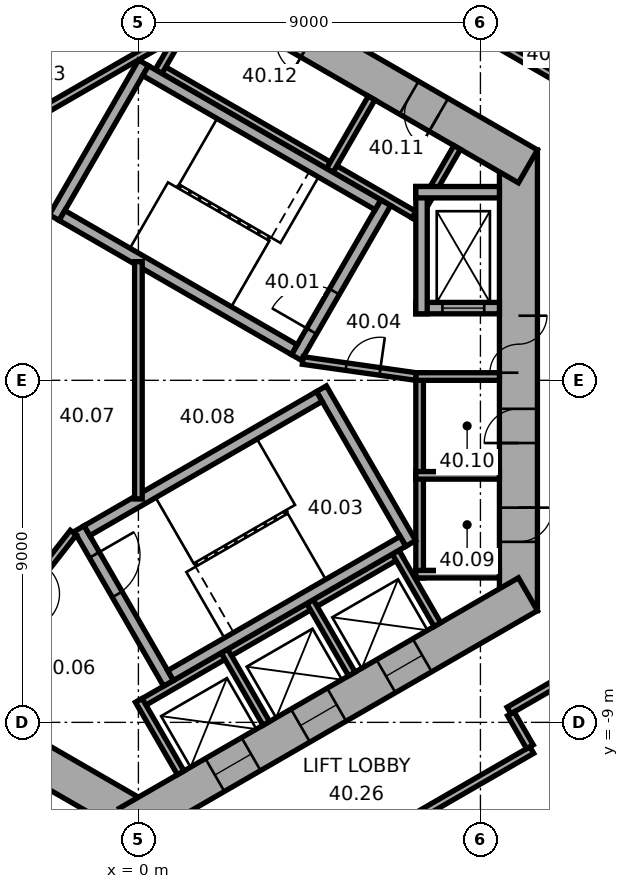
"""IFC4 building model, lengths in metres.
Left out: names, types, materials, properties, quantities, classifications, styles, units other than length and angle.
Written with IfcOpenShell. Run it as: python <this file> out.ifc"""

import sys

from ifc_helpers import new_model, si_unit, direction, frame, frame_2d, origin, place, context, subcontext, project, spatial, rectangle, extrude, element, fill, save


model = new_model("IFC4")
c1 = context("Model", 3, precision=1e-05, world=origin(), true_north=direction((0.0, 1.0)))
c2 = subcontext(c1, "Body", "Model", "MODEL_VIEW")
j1 = project(units=[si_unit("LENGTHUNIT", "METRE"), si_unit("PLANEANGLEUNIT", "RADIAN")], contexts=[c1])
p1 = place(None, origin())
s1 = spatial("IfcSite", under=j1, at=p1, CompositionType="ELEMENT")
p2 = place(p1, origin())
s2 = spatial("IfcBuilding", under=s1, at=p2, CompositionType="ELEMENT")
p3 = place(p2, frame((0.0, 0.0, 165.1)))
s3 = spatial("IfcBuildingStorey", under=s2, at=p3, CompositionType="ELEMENT", Elevation=165.1)
p4 = place(p3, frame((10.0, -6.062, 0.0), z_axis=(0.0, 0.0, 1.0), x_axis=(0.0, 1.0, 0.0)))
e1 = element("IfcWall", 1, at=p4, inside=s3, PredefinedType="SHEAR", context=c2, shape_type="SweptSolid", body=[
    extrude(rectangle(XDim=12.125, YDim=1.0, at=frame_2d((6.062, 0.0))), origin(), (0.0, 0.0, 1.0), 3.7),
])
p5 = place(p4, frame((6.262, 0.0, 0.0)))
e2 = element("IfcOpeningElement", 2, at=p5, cuts=e1, PredefinedType="OPENING", context=c2, shape_type="SweptSolid", body=[
    extrude(rectangle(XDim=1.5, YDim=2.1, at=frame_2d((0.75, 1.05))), frame((0.0, 0.51, 0.0), z_axis=(0.0, -1.0, 0.0), x_axis=(1.0, 0.0, 0.0)), (0.0, 0.0, 1.0), 1.02),
])
p6 = place(p4, frame((1.812, 0.0, 0.0)))
e3 = element("IfcOpeningElement", 3, at=p6, cuts=e1, PredefinedType="OPENING", context=c2, shape_type="SweptSolid", body=[
    extrude(rectangle(XDim=0.9, YDim=2.1, at=frame_2d((0.45, 1.05))), frame((0.0, 0.51, 0.0), z_axis=(0.0, -1.0, 0.0), x_axis=(1.0, 0.0, 0.0)), (0.0, 0.0, 1.0), 1.02),
])
p7 = place(p4, frame((4.412, 0.0, 0.0)))
e4 = element("IfcOpeningElement", 4, at=p7, cuts=e1, PredefinedType="OPENING", context=c2, shape_type="SweptSolid", body=[
    extrude(rectangle(XDim=0.9, YDim=2.1, at=frame_2d((0.45, 1.05))), frame((0.0, 0.51, 0.0), z_axis=(0.0, -1.0, 0.0), x_axis=(1.0, 0.0, 0.0)), (0.0, 0.0, 1.0), 1.02),
])
p8 = place(p3, frame((10.25, 5.629, 0.0), z_axis=(0.0, 0.0, 1.0), x_axis=(-0.866022616891, 0.50000482701, 0.0)))
e5 = element("IfcWall", 5, at=p8, inside=s3, PredefinedType="SHEAR", context=c2, shape_type="SweptSolid", body=[
    extrude(rectangle(XDim=12.125, YDim=1.0, at=frame_2d((6.062, 0.0))), origin(), (0.0, 0.0, 1.0), 3.7),
])
p9 = place(p8, frame((2.712, 0.0, 0.0)))
e6 = element("IfcOpeningElement", 6, at=p9, cuts=e5, PredefinedType="OPENING", context=c2, shape_type="SweptSolid", body=[
    extrude(rectangle(XDim=0.9, YDim=2.1, at=frame_2d((0.45, 1.05))), frame((0.0, 0.51, 0.0), z_axis=(0.0, -1.0, 0.0), x_axis=(1.0, 0.0, 0.0)), (0.0, 0.0, 1.0), 1.02),
])
p10 = place(p8, frame((6.612, 0.0, 0.0)))
e7 = element("IfcOpeningElement", 7, at=p10, cuts=e5, PredefinedType="OPENING", context=c2, shape_type="SweptSolid", body=[
    extrude(rectangle(XDim=0.9, YDim=2.1, at=frame_2d((0.45, 1.05))), frame((0.0, 0.51, 0.0), z_axis=(0.0, -1.0, 0.0), x_axis=(1.0, 0.0, 0.0)), (0.0, 0.0, 1.0), 1.02),
])
p11 = place(p3, frame((0.25, 11.691, 0.0), z_axis=(0.0, 0.0, 1.0), x_axis=(-0.866022616891, -0.50000482701, 0.0)))
e8 = element("IfcWall", 8, at=p11, inside=s3, PredefinedType="SHEAR", context=c2, shape_type="SweptSolid", body=[
    extrude(rectangle(XDim=12.125, YDim=1.0, at=frame_2d((6.062, 0.0))), origin(), (0.0, 0.0, 1.0), 3.7),
])
p12 = place(p11, frame((6.262, 0.0, 0.0)))
e9 = element("IfcOpeningElement", 9, at=p12, cuts=e8, PredefinedType="OPENING", context=c2, shape_type="SweptSolid", body=[
    extrude(rectangle(XDim=1.5, YDim=2.1, at=frame_2d((0.75, 1.05))), frame((0.0, 0.51, 0.0), z_axis=(0.0, -1.0, 0.0), x_axis=(1.0, 0.0, 0.0)), (0.0, 0.0, 1.0), 1.02),
])
p13 = place(p11, frame((3.112, 0.0, 0.0)))
e10 = element("IfcOpeningElement", 10, at=p13, cuts=e8, PredefinedType="OPENING", context=c2, shape_type="SweptSolid", body=[
    extrude(rectangle(XDim=0.9, YDim=2.1, at=frame_2d((0.45, 1.05))), frame((0.0, 0.51, 0.0), z_axis=(0.0, -1.0, 0.0), x_axis=(1.0, 0.0, 0.0)), (0.0, 0.0, 1.0), 1.02),
])
p14 = place(p3, frame((-10.25, -5.629, 0.0), z_axis=(0.0, 0.0, 1.0), x_axis=(0.866022616891, -0.50000482701, 0.0)))
e11 = element("IfcWall", 11, at=p14, inside=s3, PredefinedType="SHEAR", context=c2, shape_type="SweptSolid", body=[
    extrude(rectangle(XDim=12.125, YDim=1.0, at=frame_2d((6.062, 0.0))), origin(), (0.0, 0.0, 1.0), 3.7),
])
p15 = place(p14, frame((6.262, 0.0, 0.0)))
e12 = element("IfcOpeningElement", 12, at=p15, cuts=e11, PredefinedType="OPENING", context=c2, shape_type="SweptSolid", body=[
    extrude(rectangle(XDim=1.5, YDim=2.1, at=frame_2d((0.75, 1.05))), frame((0.0, 0.51, 0.0), z_axis=(0.0, -1.0, 0.0), x_axis=(1.0, 0.0, 0.0)), (0.0, 0.0, 1.0), 1.02),
])
p16 = place(p14, frame((1.712, 0.0, 0.0)))
e13 = element("IfcOpeningElement", 13, at=p16, cuts=e11, PredefinedType="OPENING", context=c2, shape_type="SweptSolid", body=[
    extrude(rectangle(XDim=1.1, YDim=2.1, at=frame_2d((0.55, 1.05))), frame((0.0, 0.51, 0.0), z_axis=(0.0, -1.0, 0.0), x_axis=(1.0, 0.0, 0.0)), (0.0, 0.0, 1.0), 1.02),
])
p17 = place(p14, frame((4.312, 0.0, 0.0)))
e14 = element("IfcOpeningElement", 14, at=p17, cuts=e11, PredefinedType="OPENING", context=c2, shape_type="SweptSolid", body=[
    extrude(rectangle(XDim=1.1, YDim=2.1, at=frame_2d((0.55, 1.05))), frame((0.0, 0.51, 0.0), z_axis=(0.0, -1.0, 0.0), x_axis=(1.0, 0.0, 0.0)), (0.0, 0.0, 1.0), 1.02),
])
p18 = place(p3, frame((-0.25, -11.691, 0.0), z_axis=(0.0, 0.0, 1.0), x_axis=(0.866022616891, 0.50000482701, 0.0)))
e15 = element("IfcWall", 15, at=p18, inside=s3, PredefinedType="SHEAR", context=c2, shape_type="SweptSolid", body=[
    extrude(rectangle(XDim=12.125, YDim=1.0, at=frame_2d((6.062, 0.0))), origin(), (0.0, 0.0, 1.0), 3.7),
])
p19 = place(p18, frame((2.612, 0.0, 0.0)))
e16 = element("IfcOpeningElement", 16, at=p19, cuts=e15, PredefinedType="OPENING", context=c2, shape_type="SweptSolid", body=[
    extrude(rectangle(XDim=1.1, YDim=2.1, at=frame_2d((0.55, 1.05))), frame((0.0, 0.51, 0.0), z_axis=(0.0, -1.0, 0.0), x_axis=(1.0, 0.0, 0.0)), (0.0, 0.0, 1.0), 1.02),
])
p20 = place(p18, frame((5.212, 0.0, 0.0)))
e17 = element("IfcOpeningElement", 17, at=p20, cuts=e15, PredefinedType="OPENING", context=c2, shape_type="SweptSolid", body=[
    extrude(rectangle(XDim=1.1, YDim=2.1, at=frame_2d((0.55, 1.05))), frame((0.0, 0.51, 0.0), z_axis=(0.0, -1.0, 0.0), x_axis=(1.0, 0.0, 0.0)), (0.0, 0.0, 1.0), 1.02),
])
p21 = place(p18, frame((7.812, 0.0, 0.0)))
e18 = element("IfcOpeningElement", 18, at=p21, cuts=e15, PredefinedType="OPENING", context=c2, shape_type="SweptSolid", body=[
    extrude(rectangle(XDim=1.1, YDim=2.1, at=frame_2d((0.55, 1.05))), frame((0.0, 0.51, 0.0), z_axis=(0.0, -1.0, 0.0), x_axis=(1.0, 0.0, 0.0)), (0.0, 0.0, 1.0), 1.02),
])
p22 = place(p3, frame((7.4, -5.2, 0.0), z_axis=(0.0, 0.0, 1.0), x_axis=(0.0, 1.0, 0.0)))
e19 = element("IfcWall", 19, at=p22, inside=s3, PredefinedType="PARTITIONING", context=c2, shape_type="SweptSolid", body=[
    extrude(rectangle(XDim=5.4, YDim=0.2, at=frame_2d((2.7, 0.0))), origin(), (0.0, 0.0, 1.0), 3.42),
])
for number, where, z_axis, x_axis in (
    (20, (7.3, -5.1, 0.0), (0.0, 0.0, 1.0), (1.0, 0.0, 0.0)),
    (21, (7.3, -2.5, 0.0), (0.0, 0.0, 1.0), (1.0, 0.0, 0.0)),
    (22, (7.3, 0.1, 0.0), (0.0, 0.0, 1.0), (1.0, 0.0, 0.0)),
):
    element("IfcWall", number, at=place(p3, frame(where, z_axis=z_axis, x_axis=x_axis)), inside=s3, PredefinedType="PARTITIONING", context=c2, shape_type="SweptSolid", body=[
        extrude(rectangle(XDim=2.2, YDim=0.2, at=frame_2d((1.1, 0.0))), origin(), (0.0, 0.0, 1.0), 3.42),
    ])
p23 = place(p3, frame((7.424, 4.259, 0.0), z_axis=(0.0, 0.0, 1.0), x_axis=(-0.866026010844, 0.49999894854, 0.0)))
e23 = element("IfcWall", 23, at=p23, inside=s3, PredefinedType="PARTITIONING", context=c2, shape_type="SweptSolid", body=[
    extrude(rectangle(XDim=8.0, YDim=0.2, at=frame_2d((4.0, 0.0))), origin(), (0.0, 0.0, 1.0), 3.42),
])
for number, where, z_axis, x_axis in (
    (24, (7.287, 4.222, 0.0), (0.0, 0.0, 1.0), (0.5, 0.866, 0.0)),
    (25, (5.036, 5.522, 0.0), (0.0, 0.0, 1.0), (0.5, 0.866, 0.0)),
    (26, (0.532, 8.122, 0.0), (0.0, 0.0, 1.0), (0.5, 0.866, 0.0)),
):
    element("IfcWall", number, at=place(p3, frame(where, z_axis=z_axis, x_axis=x_axis)), inside=s3, PredefinedType="PARTITIONING", context=c2, shape_type="SweptSolid", body=[
        extrude(rectangle(XDim=2.2, YDim=0.2, at=frame_2d((1.1, 0.0))), origin(), (0.0, 0.0, 1.0), 3.42),
    ])
p24 = place(p3, frame((0.803, 9.009, 0.0), z_axis=(0.0, 0.0, 1.0), x_axis=(-0.866028230842, -0.499995103361, 0.0)))
e27 = element("IfcWall", 27, at=p24, inside=s3, PredefinedType="PARTITIONING", context=c2, shape_type="SweptSolid", body=[
    extrude(rectangle(XDim=5.4, YDim=0.2, at=frame_2d((2.7, 0.0))), origin(), (0.0, 0.0, 1.0), 3.42),
])
p25 = place(p3, frame((-0.024, -8.559, 0.0), z_axis=(0.0, 0.0, 1.0), x_axis=(0.866026010844, 0.49999894854, 0.0)))
e28 = element("IfcWall", 28, at=p25, inside=s3, PredefinedType="PARTITIONING", context=c2, shape_type="SweptSolid", body=[
    extrude(rectangle(XDim=8.0, YDim=0.2, at=frame_2d((4.0, 0.0))), origin(), (0.0, 0.0, 1.0), 3.42),
])
for number, where, z_axis, x_axis in (
    (29, (0.013, -8.422, 0.0), (0.0, 0.0, 1.0), (0.5, -0.866, 0.0)),
    (30, (2.264, -7.122, 0.0), (0.0, 0.0, 1.0), (0.5, -0.866, 0.0)),
    (31, (4.516, -5.822, 0.0), (0.0, 0.0, 1.0), (0.5, -0.866, 0.0)),
    (32, (6.768, -4.522, 0.0), (0.0, 0.0, 1.0), (0.5, -0.866, 0.0)),
):
    element("IfcWall", number, at=place(p3, frame(where, z_axis=z_axis, x_axis=x_axis)), inside=s3, PredefinedType="PARTITIONING", context=c2, shape_type="SweptSolid", body=[
        extrude(rectangle(XDim=2.2, YDim=0.2, at=frame_2d((1.1, 0.0))), origin(), (0.0, 0.0, 1.0), 3.42),
    ])
p26 = place(p3, frame((4.158, 0.602, 0.0), z_axis=(0.0, 0.0, 1.0), x_axis=(0.499977259774, 0.866038532462, 0.0)))
e33 = element("IfcWall", 33, at=p26, inside=s3, PredefinedType="SHEAR", context=c2, shape_type="SweptSolid", body=[
    extrude(rectangle(XDim=4.7, YDim=0.3, at=frame_2d((2.35, 0.0))), origin(), (0.0, 0.0, 1.0), 3.42),
])
p27 = place(p26, frame((0.8, 0.0, 0.0)))
e34 = element("IfcOpeningElement", 34, at=p27, cuts=e33, PredefinedType="OPENING", context=c2, shape_type="SweptSolid", body=[
    extrude(rectangle(XDim=1.2, YDim=2.1, at=frame_2d((0.6, 1.05))), frame((0.0, 0.16, 0.0), z_axis=(0.0, -1.0, 0.0), x_axis=(1.0, 0.0, 0.0)), (0.0, 0.0, 1.0), 0.32),
])
p28 = place(p3, frame((-2.216, 4.282, 0.0), z_axis=(0.0, 0.0, 1.0), x_axis=(0.499977259774, 0.866038532462, 0.0)))
e35 = element("IfcWall", 35, at=p28, inside=s3, PredefinedType="SHEAR", context=c2, shape_type="SweptSolid", body=[
    extrude(rectangle(XDim=4.7, YDim=0.3, at=frame_2d((2.35, 0.0))), origin(), (0.0, 0.0, 1.0), 3.42),
])
for number, where, z_axis, x_axis in (
    (36, (4.103, 0.807, 0.0), (0.0, 0.0, 1.0), (-0.866, 0.5, 0.0)),
    (37, (6.303, 4.617, 0.0), (0.0, 0.0, 1.0), (-0.866, 0.5, 0.0)),
):
    element("IfcWall", number, at=place(p3, frame(where, z_axis=z_axis, x_axis=x_axis)), inside=s3, PredefinedType="SHEAR", context=c2, shape_type="SweptSolid", body=[
        extrude(rectangle(XDim=7.06, YDim=0.3, at=frame_2d((3.53, 0.0))), origin(), (0.0, 0.0, 1.0), 3.42),
    ])
p29 = place(p3, frame((-1.558, -3.902, 0.0), z_axis=(0.0, 0.0, 1.0), x_axis=(0.499977259774, -0.866038532462, 0.0)))
e38 = element("IfcWall", 38, at=p29, inside=s3, PredefinedType="SHEAR", context=c2, shape_type="SweptSolid", body=[
    extrude(rectangle(XDim=4.7, YDim=0.3, at=frame_2d((2.35, 0.0))), origin(), (0.0, 0.0, 1.0), 3.42),
])
p30 = place(p29, frame((0.8, 0.0, 0.0)))
e39 = element("IfcOpeningElement", 39, at=p30, cuts=e38, PredefinedType="OPENING", context=c2, shape_type="SweptSolid", body=[
    extrude(rectangle(XDim=1.2, YDim=2.1, at=frame_2d((0.6, 1.05))), frame((0.0, 0.16, 0.0), z_axis=(0.0, -1.0, 0.0), x_axis=(1.0, 0.0, 0.0)), (0.0, 0.0, 1.0), 0.32),
])
p31 = place(p3, frame((4.816, -0.222, 0.0), z_axis=(0.0, 0.0, 1.0), x_axis=(0.499977259774, -0.866038532462, 0.0)))
e40 = element("IfcWall", 40, at=p31, inside=s3, PredefinedType="SHEAR", context=c2, shape_type="SweptSolid", body=[
    extrude(rectangle(XDim=4.7, YDim=0.3, at=frame_2d((2.35, 0.0))), origin(), (0.0, 0.0, 1.0), 3.42),
])
for number, where, z_axis, x_axis in (
    (41, (-1.353, -3.957, 0.0), (0.0, 0.0, 1.0), (0.866, 0.5, 0.0)),
    (42, (0.847, -7.767, 0.0), (0.0, 0.0, 1.0), (0.866, 0.5, 0.0)),
):
    element("IfcWall", number, at=place(p3, frame(where, z_axis=z_axis, x_axis=x_axis)), inside=s3, PredefinedType="SHEAR", context=c2, shape_type="SweptSolid", body=[
        extrude(rectangle(XDim=7.06, YDim=0.3, at=frame_2d((3.53, 0.0))), origin(), (0.0, 0.0, 1.0), 3.42),
    ])
p32 = place(p3, frame((7.3, 1.9, 0.0), z_axis=(0.0, 0.0, 1.0), x_axis=(1.0, 0.0, 0.0)))
e43 = element("IfcWall", 43, at=p32, inside=s3, PredefinedType="SHEAR", context=c2, shape_type="SweptSolid", body=[
    extrude(rectangle(XDim=2.2, YDim=0.3, at=frame_2d((1.1, 0.0))), origin(), (0.0, 0.0, 1.0), 3.42),
])
p33 = place(p32, frame((0.7, 0.0, 0.0)))
e44 = element("IfcOpeningElement", 44, at=p33, cuts=e43, PredefinedType="OPENING", context=c2, shape_type="SweptSolid", body=[
    extrude(rectangle(XDim=1.1, YDim=2.1, at=frame_2d((0.55, 1.05))), frame((0.0, 0.16, 0.0), z_axis=(0.0, -1.0, 0.0), x_axis=(1.0, 0.0, 0.0)), (0.0, 0.0, 1.0), 0.32),
])
p34 = place(p3, frame((7.45, 1.75, 0.0), z_axis=(0.0, 0.0, 1.0), x_axis=(0.0, 1.0, 0.0)))
e45 = element("IfcWall", 45, at=p34, inside=s3, PredefinedType="SHEAR", context=c2, shape_type="SweptSolid", body=[
    extrude(rectangle(XDim=3.35, YDim=0.3, at=frame_2d((1.675, 0.0))), origin(), (0.0, 0.0, 1.0), 3.42),
])
p35 = place(p3, frame((7.3, 4.95, 0.0), z_axis=(0.0, 0.0, 1.0), x_axis=(1.0, 0.0, 0.0)))
e46 = element("IfcWall", 46, at=p35, inside=s3, PredefinedType="SHEAR", context=c2, shape_type="SweptSolid", body=[
    extrude(rectangle(XDim=2.2, YDim=0.3, at=frame_2d((1.1, 0.0))), origin(), (0.0, 0.0, 1.0), 3.42),
])
p36 = place(p3, frame((4.327, 0.521, 0.0), z_axis=(0.0, 0.0, 1.0), x_axis=(0.990124376366, -0.14019172346, 0.0)))
e47 = element("IfcWall", 47, at=p36, inside=s3, PredefinedType="PARTITIONING", context=c2, shape_type="SweptSolid", body=[
    extrude(rectangle(XDim=3.002, YDim=0.2, at=frame_2d((1.501, 0.0))), origin(), (0.0, 0.0, 1.0), 3.42),
])
p37 = place(p36, frame((1.15, 0.0, 0.0)))
e48 = element("IfcOpeningElement", 48, at=p37, cuts=e47, PredefinedType="OPENING", context=c2, shape_type="SweptSolid", body=[
    extrude(rectangle(XDim=0.9, YDim=2.1, at=frame_2d((0.45, 1.05))), frame((0.0, 0.11, 0.0), z_axis=(0.0, -1.0, 0.0), x_axis=(1.0, 0.0, 0.0)), (0.0, 0.0, 1.0), 0.22),
])
p38 = place(p3, frame((-1.712, -4.008, 0.0), z_axis=(0.0, 0.0, 1.0), x_axis=(-0.616549420702, -0.787316208287, 0.0)))
e49 = element("IfcWall", 49, at=p38, inside=s3, PredefinedType="PARTITIONING", context=c2, shape_type="SweptSolid", body=[
    extrude(rectangle(XDim=3.002, YDim=0.2, at=frame_2d((1.501, 0.0))), origin(), (0.0, 0.0, 1.0), 3.42),
])
p39 = place(p38, frame((1.15, 0.0, 0.0)))
e50 = element("IfcOpeningElement", 50, at=p39, cuts=e49, PredefinedType="OPENING", context=c2, shape_type="SweptSolid", body=[
    extrude(rectangle(XDim=0.9, YDim=2.1, at=frame_2d((0.45, 1.05))), frame((0.0, 0.11, 0.0), z_axis=(0.0, -1.0, 0.0), x_axis=(1.0, 0.0, 0.0)), (0.0, 0.0, 1.0), 0.22),
])
p40 = place(p3, frame((0.0, -3.122, 0.0), z_axis=(0.0, 0.0, 1.0), x_axis=(0.0, 1.0, 0.0)))
e51 = element("IfcWall", 51, at=p40, inside=s3, PredefinedType="PARTITIONING", context=c2, shape_type="SweptSolid", body=[
    extrude(rectangle(XDim=6.245, YDim=0.2, at=frame_2d((3.122, 0.0))), origin(), (0.0, 0.0, 1.0), 3.42),
])
p41 = place(p3, frame((2.816, -14.079, 0.0), z_axis=(0.0, 0.0, 1.0), x_axis=(0.866021128829, 0.500007404367, 0.0)))
e52 = element("IfcWall", 52, at=p41, inside=s3, PredefinedType="PARTITIONING", context=c2, shape_type="SweptSolid", body=[
    extrude(rectangle(XDim=8.702, YDim=0.2, at=frame_2d((4.351, 0.0))), origin(), (0.0, 0.0, 1.0), 3.42),
])
p42 = place(p41, frame((0.833, 0.0, 0.0)))
e53 = element("IfcOpeningElement", 53, at=p42, cuts=e52, PredefinedType="OPENING", context=c2, shape_type="SweptSolid", body=[
    extrude(rectangle(XDim=1.0, YDim=2.1, at=frame_2d((0.5, 1.05))), frame((0.0, 0.11, 0.0), z_axis=(0.0, -1.0, 0.0), x_axis=(1.0, 0.0, 0.0)), (0.0, 0.0, 1.0), 0.22),
])
p43 = place(p3, frame((9.752, -8.688, 0.0), z_axis=(0.0, 0.0, 1.0), x_axis=(0.865974105138, 0.500088841337, 0.0)))
e54 = element("IfcWall", 54, at=p43, inside=s3, PredefinedType="PARTITIONING", context=c2, shape_type="SweptSolid", body=[
    extrude(rectangle(XDim=1.961, YDim=0.2, at=frame_2d((0.98, 0.0))), origin(), (0.0, 0.0, 1.0), 3.42),
])
p44 = place(p3, frame((10.302, -9.642, 0.0), z_axis=(0.0, 0.0, 1.0), x_axis=(-0.500074377092, 0.865982457891, 0.0)))
e55 = element("IfcWall", 55, at=p44, inside=s3, PredefinedType="PARTITIONING", context=c2, shape_type="SweptSolid", body=[
    extrude(rectangle(XDim=1.001, YDim=0.2, at=frame_2d((0.5, 0.0))), origin(), (0.0, 0.0, 1.0), 3.42),
])
p45 = place(p3, frame((11.233, 7.833, 0.0), z_axis=(0.0, 0.0, 1.0), x_axis=(-0.866008176907, 0.50002983664, 0.0)))
e56 = element("IfcWall", 56, at=p45, inside=s3, PredefinedType="PARTITIONING", context=c2, shape_type="SweptSolid", body=[
    extrude(rectangle(XDim=2.2, YDim=0.2, at=frame_2d((1.1, 0.0))), origin(), (0.0, 0.0, 1.0), 3.42),
])
p46 = place(p5, origin())
e57 = element("IfcDoor", 57, at=p46, inside=s3, OperationType="DOUBLE_DOOR_SINGLE_SWING", PredefinedType="DOOR", context=c2, shape_type="SweptSolid", body=[
    extrude(rectangle(XDim=1.5, YDim=2.1, at=frame_2d((0.75, 1.05))), frame((0.0, 0.025, 0.0), z_axis=(0.0, -1.0, 0.0), x_axis=(1.0, 0.0, 0.0)), (0.0, 0.0, 1.0), 0.05),
])
fill(e2, e57)
p47 = place(p27, origin())
e58 = element("IfcDoor", 58, at=p47, inside=s3, OperationType="SINGLE_SWING_RIGHT", PredefinedType="DOOR", context=c2, shape_type="SweptSolid", body=[
    extrude(rectangle(XDim=1.2, YDim=2.1, at=frame_2d((0.6, 1.05))), frame((0.0, 0.025, 0.0), z_axis=(0.0, -1.0, 0.0), x_axis=(1.0, 0.0, 0.0)), (0.0, 0.0, 1.0), 0.05),
])
fill(e34, e58)
p48 = place(p30, origin())
e59 = element("IfcDoor", 59, at=p48, inside=s3, OperationType="SINGLE_SWING_RIGHT", PredefinedType="DOOR", context=c2, shape_type="SweptSolid", body=[
    extrude(rectangle(XDim=1.2, YDim=2.1, at=frame_2d((0.6, 1.05))), frame((0.0, 0.025, 0.0), z_axis=(0.0, -1.0, 0.0), x_axis=(1.0, 0.0, 0.0)), (0.0, 0.0, 1.0), 0.05),
])
fill(e39, e59)
p49 = place(p37, origin())
e60 = element("IfcDoor", 60, at=p49, inside=s3, OperationType="SINGLE_SWING_LEFT", PredefinedType="DOOR", context=c2, shape_type="SweptSolid", body=[
    extrude(rectangle(XDim=0.9, YDim=2.1, at=frame_2d((0.45, 1.05))), frame((0.0, 0.025, 0.0), z_axis=(0.0, -1.0, 0.0), x_axis=(1.0, 0.0, 0.0)), (0.0, 0.0, 1.0), 0.05),
])
fill(e48, e60)
p50 = place(p6, origin())
e61 = element("IfcDoor", 61, at=p50, inside=s3, OperationType="SINGLE_SWING_LEFT", PredefinedType="DOOR", context=c2, shape_type="SweptSolid", body=[
    extrude(rectangle(XDim=0.9, YDim=2.1, at=frame_2d((0.45, 1.05))), frame((0.0, 0.025, 0.0), z_axis=(0.0, -1.0, 0.0), x_axis=(1.0, 0.0, 0.0)), (0.0, 0.0, 1.0), 0.05),
])
fill(e3, e61)
p51 = place(p7, origin())
e62 = element("IfcDoor", 62, at=p51, inside=s3, OperationType="SINGLE_SWING_LEFT", PredefinedType="DOOR", context=c2, shape_type="SweptSolid", body=[
    extrude(rectangle(XDim=0.9, YDim=2.1, at=frame_2d((0.45, 1.05))), frame((0.0, 0.025, 0.0), z_axis=(0.0, -1.0, 0.0), x_axis=(1.0, 0.0, 0.0)), (0.0, 0.0, 1.0), 0.05),
])
fill(e4, e62)
p52 = place(p9, origin())
e63 = element("IfcDoor", 63, at=p52, inside=s3, OperationType="SINGLE_SWING_LEFT", PredefinedType="DOOR", context=c2, shape_type="SweptSolid", body=[
    extrude(rectangle(XDim=0.9, YDim=2.1, at=frame_2d((0.45, 1.05))), frame((0.0, 0.025, 0.0), z_axis=(0.0, -1.0, 0.0), x_axis=(1.0, 0.0, 0.0)), (0.0, 0.0, 1.0), 0.05),
])
fill(e6, e63)
p53 = place(p33, origin())
e64 = element("IfcDoor", 64, at=p53, inside=s3, OperationType="DOUBLE_DOOR_SLIDING", PredefinedType="DOOR", context=c2, shape_type="SweptSolid", body=[
    extrude(rectangle(XDim=1.1, YDim=2.1, at=frame_2d((0.55, 1.05))), frame((0.0, 0.025, 0.0), z_axis=(0.0, -1.0, 0.0), x_axis=(1.0, 0.0, 0.0)), (0.0, 0.0, 1.0), 0.05),
])
fill(e44, e64)
p54 = place(p19, origin())
e65 = element("IfcDoor", 65, at=p54, inside=s3, OperationType="DOUBLE_DOOR_SLIDING", PredefinedType="DOOR", context=c2, shape_type="SweptSolid", body=[
    extrude(rectangle(XDim=1.1, YDim=2.1, at=frame_2d((0.55, 1.05))), frame((0.0, 0.025, 0.0), z_axis=(0.0, -1.0, 0.0), x_axis=(1.0, 0.0, 0.0)), (0.0, 0.0, 1.0), 0.05),
])
fill(e16, e65)
p55 = place(p20, origin())
e66 = element("IfcDoor", 66, at=p55, inside=s3, OperationType="DOUBLE_DOOR_SLIDING", PredefinedType="DOOR", context=c2, shape_type="SweptSolid", body=[
    extrude(rectangle(XDim=1.1, YDim=2.1, at=frame_2d((0.55, 1.05))), frame((0.0, 0.025, 0.0), z_axis=(0.0, -1.0, 0.0), x_axis=(1.0, 0.0, 0.0)), (0.0, 0.0, 1.0), 0.05),
])
fill(e17, e66)
p56 = place(p21, origin())
e67 = element("IfcDoor", 67, at=p56, inside=s3, OperationType="DOUBLE_DOOR_SLIDING", PredefinedType="DOOR", context=c2, shape_type="SweptSolid", body=[
    extrude(rectangle(XDim=1.1, YDim=2.1, at=frame_2d((0.55, 1.05))), frame((0.0, 0.025, 0.0), z_axis=(0.0, -1.0, 0.0), x_axis=(1.0, 0.0, 0.0)), (0.0, 0.0, 1.0), 0.05),
])
fill(e18, e67)
save(model, sys.argv[1])
